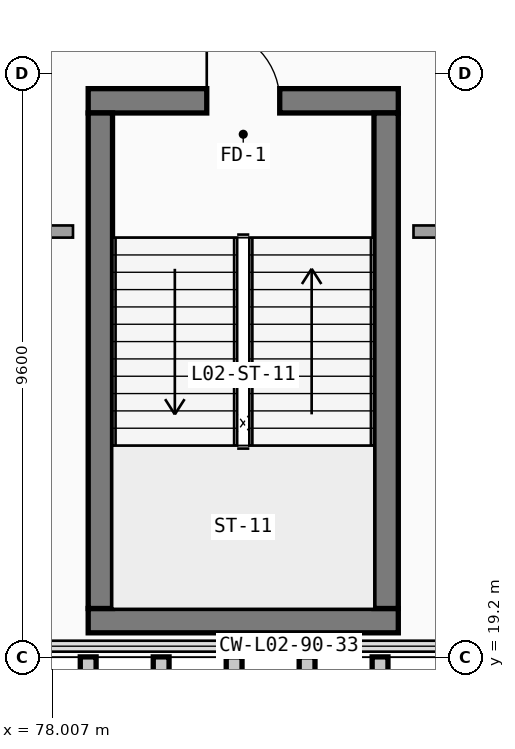
"""IFC4 building model, lengths in metres.
Left out: names, types, materials, properties, quantities, classifications, styles, units other than length and angle.
Written with IfcOpenShell. Run it as: python <this file> out.ifc"""

import sys

from ifc_helpers import new_model, si_unit, direction, frame, frame_2d, origin, place, context, subcontext, project, spatial, rectangle, extrude, element, fill, save


model = new_model("IFC4")
c1 = context("Model", 3, precision=1e-05, world=origin(), true_north=direction((0.0, 1.0)))
c2 = subcontext(c1, "Body", "Model", "MODEL_VIEW")
j1 = project(units=[si_unit("LENGTHUNIT", "METRE"), si_unit("PLANEANGLEUNIT", "RADIAN")], contexts=[c1])
p1 = place(None, origin())
s1 = spatial("IfcSite", under=j1, at=p1, CompositionType="ELEMENT")
p2 = place(p1, origin())
s2 = spatial("IfcBuilding", under=s1, at=p2, CompositionType="ELEMENT")
p3 = place(p2, frame((0.0, 0.0, 9.6)))
s3 = spatial("IfcBuildingStorey", under=s2, at=p3, CompositionType="ELEMENT", Elevation=9.6)
p4 = place(p3, frame((78.6, 19.8, 0.0), z_axis=(0.0, 0.0, 1.0), x_axis=(1.0, 0.0, 0.0)))
e1 = element("IfcWall", 1, at=p4, inside=s3, PredefinedType="SHEAR", context=c2, shape_type="SweptSolid", body=[
    extrude(rectangle(XDim=5.1, YDim=0.4, at=frame_2d((2.55, 0.0))), origin(), (0.0, 0.0, 1.0), 4.22),
])
p5 = place(p3, frame((83.7, 28.35, 0.0), z_axis=(0.0, 0.0, 1.0), x_axis=(-1.0, 0.0, 0.0)))
e2 = element("IfcWall", 2, at=p5, inside=s3, PredefinedType="SHEAR", context=c2, shape_type="SweptSolid", body=[
    extrude(rectangle(XDim=5.1, YDim=0.4, at=frame_2d((2.55, 0.0))), origin(), (0.0, 0.0, 1.0), 4.22),
])
p6 = place(p5, frame((3.15, 0.0, 0.0), z_axis=(0.0, 0.0, 1.0), x_axis=(-1.0, 0.0, 0.0)))
e3 = element("IfcOpeningElement", 3, at=p6, cuts=e2, PredefinedType="OPENING", context=c2, shape_type="SweptSolid", body=[
    extrude(rectangle(XDim=1.2, YDim=2.2, at=frame_2d((0.6, 1.1))), frame((0.0, 0.21, 0.0), z_axis=(0.0, -1.0, 0.0), x_axis=(1.0, 0.0, 0.0)), (0.0, 0.0, 1.0), 0.42),
])
for number, where, z_axis, x_axis in (
    (4, (78.8, 28.15, 0.0), (0.0, 0.0, 1.0), (0.0, -1.0, 0.0)),
    (5, (83.5, 20.0, 0.0), (0.0, 0.0, 1.0), (0.0, 1.0, 0.0)),
):
    element("IfcWall", number, at=place(p3, frame(where, z_axis=z_axis, x_axis=x_axis)), inside=s3, PredefinedType="SHEAR", context=c2, shape_type="SweptSolid", body=[
        extrude(rectangle(XDim=8.15, YDim=0.4, at=frame_2d((4.075, 0.0))), origin(), (0.0, 0.0, 1.0), 4.22),
    ])
p7 = place(p3, frame((87.62, 26.2, 0.0), z_axis=(0.0, 0.0, 1.0), x_axis=(-1.0, 0.0, 0.0)))
e6 = element("IfcWall", 6, at=p7, inside=s3, PredefinedType="PARTITIONING", context=c2, shape_type="SweptSolid", body=[
    extrude(rectangle(XDim=3.67, YDim=0.2, at=frame_2d((1.835, 0.0))), origin(), (0.0, 0.0, 1.0), 3.613),
])
p8 = place(p3, frame((78.35, 26.2, 0.0), z_axis=(0.0, 0.0, 1.0), x_axis=(-1.0, 0.0, 0.0)))
e7 = element("IfcWall", 7, at=p8, inside=s3, PredefinedType="PARTITIONING", context=c2, shape_type="SweptSolid", body=[
    extrude(rectangle(XDim=2.35, YDim=0.2, at=frame_2d((1.175, 0.0))), origin(), (0.0, 0.0, 1.0), 3.613),
])
p9 = place(p6, origin())
e8 = element("IfcDoor", 8, at=p9, inside=s3, OperationType="SINGLE_SWING_LEFT", PredefinedType="DOOR", context=c2, shape_type="SweptSolid", body=[
    extrude(rectangle(XDim=1.2, YDim=2.2, at=frame_2d((0.6, 1.1))), frame((0.0, 0.025, 0.0), z_axis=(0.0, -1.0, 0.0), x_axis=(1.0, 0.0, 0.0)), (0.0, 0.0, 1.0), 0.05),
])
fill(e3, e8)
save(model, sys.argv[1])
